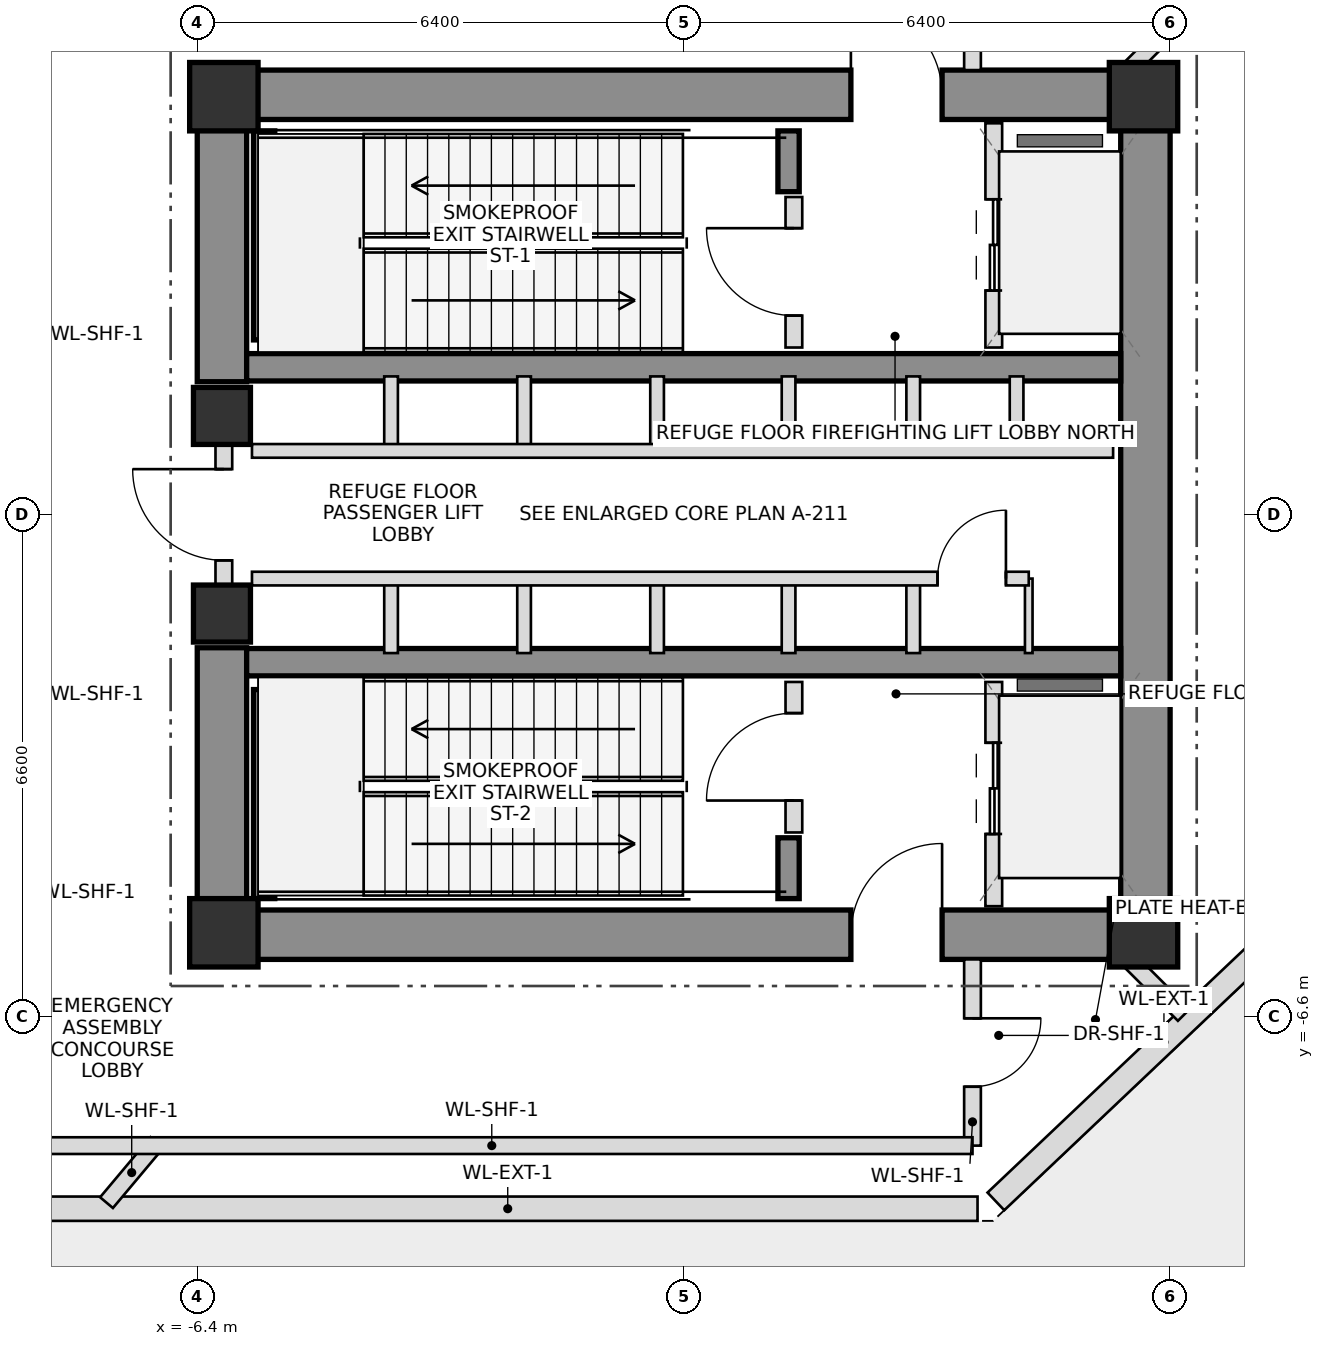
"""IFC4 building model, lengths in metres.
Left out: names, types, materials, properties, quantities, classifications, styles, units other than length and angle.
Written with IfcOpenShell. Run it as: python <this file> out.ifc"""

import sys

from ifc_helpers import new_model, si_unit, direction, frame, frame_2d, origin, origin_2d, place, context, subcontext, project, spatial, rectangle, extrude, source, transform, mapped, element, fill, save


model = new_model("IFC4")
c1 = context("Model", 3, precision=1e-05, world=origin(), true_north=direction((0.0, 1.0)))
c2 = subcontext(c1, "Body", "Model", "MODEL_VIEW")
j1 = project(units=[si_unit("LENGTHUNIT", "METRE"), si_unit("PLANEANGLEUNIT", "RADIAN")], contexts=[c1])
p1 = place(None, origin())
s1 = spatial("IfcSite", under=j1, at=p1, CompositionType="ELEMENT")
p2 = place(p1, origin())
s2 = spatial("IfcBuilding", under=s1, at=p2, CompositionType="ELEMENT")
p3 = place(p2, frame((0.0, 0.0, 119.9)))
s3 = spatial("IfcBuildingStorey", under=s2, at=p3, CompositionType="ELEMENT", Elevation=119.9)
m1 = source(origin(), c2, "Body", "SweptSolid", [
    extrude(rectangle(XDim=0.9, YDim=0.9, at=origin_2d()), origin(), (0.0, 0.0, 1.0), 5.1),
])
for number, where, z_axis, x_axis in (
    (1, (-6.05, -5.5, 0.0), (0.0, 0.0, 1.0), (1.0, 0.0, 0.0)),
    (2, (6.05, -5.5, 0.0), (0.0, 0.0, 1.0), (1.0, 0.0, 0.0)),
    (3, (6.05, 5.5, 0.0), (0.0, 0.0, 1.0), (1.0, 0.0, 0.0)),
    (4, (-6.05, 5.5, 0.0), (0.0, 0.0, 1.0), (1.0, 0.0, 0.0)),
):
    element("IfcColumn", number, at=place(p3, frame(where, z_axis=z_axis, x_axis=x_axis)), inside=s3, PredefinedType="COLUMN", context=c2, shape_type="MappedRepresentation", body=[
        mapped(m1, transform((0.0, 0.0, 0.0), scale=1.0)),
    ])
p4 = place(p3, frame((-6.4, 5.525, 0.0), z_axis=(0.0, 0.0, 1.0), x_axis=(1.0, 0.0, 0.0)))
e5 = element("IfcWall", 5, at=p4, inside=s3, PredefinedType="SHEAR", context=c2, shape_type="SweptSolid", body=[
    extrude(rectangle(XDim=12.8, YDim=0.65, at=frame_2d((6.4, 0.0))), origin(), (0.0, 0.0, 1.0), 5.1),
])
p5 = place(p4, frame((8.6, 0.0, 0.0)))
e6 = element("IfcOpeningElement", 6, at=p5, cuts=e5, PredefinedType="OPENING", context=c2, shape_type="SweptSolid", body=[
    extrude(rectangle(XDim=1.2, YDim=2.2, at=frame_2d((0.6, 1.1))), frame((0.0, 0.335, 0.0), z_axis=(0.0, -1.0, 0.0), x_axis=(1.0, 0.0, 0.0)), (0.0, 0.0, 1.0), 0.67),
])
p6 = place(p3, frame((-6.4, -5.525, 0.0), z_axis=(0.0, 0.0, 1.0), x_axis=(1.0, 0.0, 0.0)))
e7 = element("IfcWall", 7, at=p6, inside=s3, PredefinedType="SHEAR", context=c2, shape_type="SweptSolid", body=[
    extrude(rectangle(XDim=12.8, YDim=0.65, at=frame_2d((6.4, 0.0))), origin(), (0.0, 0.0, 1.0), 5.1),
])
p7 = place(p6, frame((8.6, 0.0, 0.0)))
e8 = element("IfcOpeningElement", 8, at=p7, cuts=e7, PredefinedType="OPENING", context=c2, shape_type="SweptSolid", body=[
    extrude(rectangle(XDim=1.2, YDim=2.2, at=frame_2d((0.6, 1.1))), frame((0.0, 0.335, 0.0), z_axis=(0.0, -1.0, 0.0), x_axis=(1.0, 0.0, 0.0)), (0.0, 0.0, 1.0), 0.67),
])
p8 = place(p3, frame((6.075, -5.2, 0.0), z_axis=(0.0, 0.0, 1.0), x_axis=(0.0, 1.0, 0.0)))
e9 = element("IfcWall", 9, at=p8, inside=s3, PredefinedType="SHEAR", context=c2, shape_type="SweptSolid", body=[
    extrude(rectangle(XDim=10.4, YDim=0.65, at=frame_2d((5.2, 0.0))), origin(), (0.0, 0.0, 1.0), 5.1),
])
for number, where, z_axis, x_axis in (
    (10, (-6.075, -5.2, 0.0), (0.0, 0.0, 1.0), (0.0, 1.0, 0.0)),
    (11, (-6.075, 1.75, 0.0), (0.0, 0.0, 1.0), (0.0, 1.0, 0.0)),
):
    element("IfcWall", number, at=place(p3, frame(where, z_axis=z_axis, x_axis=x_axis)), inside=s3, PredefinedType="SHEAR", context=c2, shape_type="SweptSolid", body=[
        extrude(rectangle(XDim=3.45, YDim=0.65, at=frame_2d((1.725, 0.0))), origin(), (0.0, 0.0, 1.0), 5.1),
    ])
for number, where, z_axis, x_axis in (
    (12, (-5.75, 1.94, 0.0), (0.0, 0.0, 1.0), (1.0, 0.0, 0.0)),
    (13, (-5.75, -1.94, 0.0), (0.0, 0.0, 1.0), (1.0, 0.0, 0.0)),
):
    element("IfcWall", number, at=place(p3, frame(where, z_axis=z_axis, x_axis=x_axis)), inside=s3, PredefinedType="SHEAR", context=c2, shape_type="SweptSolid", body=[
        extrude(rectangle(XDim=11.5, YDim=0.36, at=frame_2d((5.75, 0.0))), origin(), (0.0, 0.0, 1.0), 5.1),
    ])
p9 = place(p3, frame((-5.52, 2.3, 0.0), z_axis=(0.0, 0.0, 1.0), x_axis=(0.0, 1.0, 0.0)))
e14 = element("IfcWall", 14, at=p9, inside=s3, PredefinedType="SHEAR", context=c2, shape_type="SweptSolid", body=[
    extrude(rectangle(XDim=2.75, YDim=0.28, at=frame_2d((1.375, 0.0))), origin(), (0.0, 0.0, 1.0), 5.1),
])
p10 = place(p3, frame((1.38, 4.25, 0.0), z_axis=(0.0, 0.0, 1.0), x_axis=(0.0, 1.0, 0.0)))
e15 = element("IfcWall", 15, at=p10, inside=s3, PredefinedType="SHEAR", context=c2, shape_type="SweptSolid", body=[
    extrude(rectangle(XDim=0.8, YDim=0.28, at=frame_2d((0.4, 0.0))), origin(), (0.0, 0.0, 1.0), 5.1),
])
p11 = place(p3, frame((-5.52, -5.05, 0.0), z_axis=(0.0, 0.0, 1.0), x_axis=(0.0, 1.0, 0.0)))
e16 = element("IfcWall", 16, at=p11, inside=s3, PredefinedType="SHEAR", context=c2, shape_type="SweptSolid", body=[
    extrude(rectangle(XDim=2.75, YDim=0.28, at=frame_2d((1.375, 0.0))), origin(), (0.0, 0.0, 1.0), 5.1),
])
p12 = place(p3, frame((1.38, -5.05, 0.0), z_axis=(0.0, 0.0, 1.0), x_axis=(0.0, 1.0, 0.0)))
e17 = element("IfcWall", 17, at=p12, inside=s3, PredefinedType="SHEAR", context=c2, shape_type="SweptSolid", body=[
    extrude(rectangle(XDim=0.8, YDim=0.28, at=frame_2d((0.4, 0.0))), origin(), (0.0, 0.0, 1.0), 5.1),
])
m2 = source(origin(), c2, "Body", "SweptSolid", [
    extrude(rectangle(XDim=0.75, YDim=0.75, at=origin_2d()), origin(), (0.0, 0.0, 1.0), 5.1),
])
for number, where, z_axis, x_axis in (
    (18, (-6.075, -1.3, 0.0), (0.0, 0.0, 1.0), (1.0, 0.0, 0.0)),
    (19, (-6.075, 1.3, 0.0), (0.0, 0.0, 1.0), (1.0, 0.0, 0.0)),
):
    element("IfcColumn", number, at=place(p3, frame(where, z_axis=z_axis, x_axis=x_axis)), inside=s3, PredefinedType="COLUMN", context=c2, shape_type="MappedRepresentation", body=[
        mapped(m2, transform((0.0, 0.0, 0.0), scale=1.0)),
    ])
p13 = place(p3, frame((-6.05, -0.95, 0.0), z_axis=(0.0, 0.0, 1.0), x_axis=(0.0, 1.0, 0.0)))
e20 = element("IfcWall", 20, at=p13, inside=s3, PredefinedType="PLUMBINGWALL", context=c2, shape_type="SweptSolid", body=[
    extrude(rectangle(XDim=1.9, YDim=0.22, at=frame_2d((0.95, 0.0))), origin(), (0.0, 0.0, 1.0), 3.88),
])
p14 = place(p13, frame((0.35, 0.0, 0.0)))
e21 = element("IfcOpeningElement", 21, at=p14, cuts=e20, PredefinedType="OPENING", context=c2, shape_type="SweptSolid", body=[
    extrude(rectangle(XDim=1.2, YDim=2.2, at=frame_2d((0.6, 1.1))), frame((0.0, 0.12, 0.0), z_axis=(0.0, -1.0, 0.0), x_axis=(1.0, 0.0, 0.0)), (0.0, 0.0, 1.0), 0.24),
])
p15 = place(p3, frame((1.45, 2.2, 0.0), z_axis=(0.0, 0.0, 1.0), x_axis=(0.0, 1.0, 0.0)))
e22 = element("IfcWall", 22, at=p15, inside=s3, PredefinedType="PLUMBINGWALL", context=c2, shape_type="SweptSolid", body=[
    extrude(rectangle(XDim=1.98, YDim=0.22, at=frame_2d((0.99, 0.0))), origin(), (0.0, 0.0, 1.0), 4.9),
])
p16 = place(p15, frame((0.42, 0.0, 0.0)))
e23 = element("IfcOpeningElement", 23, at=p16, cuts=e22, PredefinedType="OPENING", context=c2, shape_type="SweptSolid", body=[
    extrude(rectangle(XDim=1.15, YDim=2.15, at=frame_2d((0.575, 1.075))), frame((0.0, 0.12, 0.0), z_axis=(0.0, -1.0, 0.0), x_axis=(1.0, 0.0, 0.0)), (0.0, 0.0, 1.0), 0.24),
])
p17 = place(p3, frame((4.08, 2.2, 0.0), z_axis=(0.0, 0.0, 1.0), x_axis=(0.0, 1.0, 0.0)))
e24 = element("IfcWall", 24, at=p17, inside=s3, PredefinedType="PLUMBINGWALL", context=c2, shape_type="SweptSolid", body=[
    extrude(rectangle(XDim=2.95, YDim=0.22, at=frame_2d((1.475, 0.0))), origin(), (0.0, 0.0, 1.0), 4.9),
])
p18 = place(p17, frame((0.75, 0.0, 0.0)))
e25 = element("IfcOpeningElement", 25, at=p18, cuts=e24, PredefinedType="OPENING", context=c2, shape_type="SweptSolid", body=[
    extrude(rectangle(XDim=1.2, YDim=2.25, at=frame_2d((0.6, 1.125))), frame((0.0, 0.12, 0.0), z_axis=(0.0, -1.0, 0.0), x_axis=(1.0, 0.0, 0.0)), (0.0, 0.0, 1.0), 0.24),
])
p19 = place(p3, frame((1.45, -4.18, 0.0), z_axis=(0.0, 0.0, 1.0), x_axis=(0.0, 1.0, 0.0)))
e26 = element("IfcWall", 26, at=p19, inside=s3, PredefinedType="PLUMBINGWALL", context=c2, shape_type="SweptSolid", body=[
    extrude(rectangle(XDim=1.98, YDim=0.22, at=frame_2d((0.99, 0.0))), origin(), (0.0, 0.0, 1.0), 4.9),
])
p20 = place(p19, frame((0.42, 0.0, 0.0)))
e27 = element("IfcOpeningElement", 27, at=p20, cuts=e26, PredefinedType="OPENING", context=c2, shape_type="SweptSolid", body=[
    extrude(rectangle(XDim=1.15, YDim=2.15, at=frame_2d((0.575, 1.075))), frame((0.0, 0.12, 0.0), z_axis=(0.0, -1.0, 0.0), x_axis=(1.0, 0.0, 0.0)), (0.0, 0.0, 1.0), 0.24),
])
p21 = place(p3, frame((4.08, -5.15, 0.0), z_axis=(0.0, 0.0, 1.0), x_axis=(0.0, 1.0, 0.0)))
e28 = element("IfcWall", 28, at=p21, inside=s3, PredefinedType="PLUMBINGWALL", context=c2, shape_type="SweptSolid", body=[
    extrude(rectangle(XDim=2.95, YDim=0.22, at=frame_2d((1.475, 0.0))), origin(), (0.0, 0.0, 1.0), 4.9),
])
p22 = place(p21, frame((0.95, 0.0, 0.0)))
e29 = element("IfcOpeningElement", 29, at=p22, cuts=e28, PredefinedType="OPENING", context=c2, shape_type="SweptSolid", body=[
    extrude(rectangle(XDim=1.2, YDim=2.25, at=frame_2d((0.6, 1.125))), frame((0.0, 0.12, 0.0), z_axis=(0.0, -1.0, 0.0), x_axis=(1.0, 0.0, 0.0)), (0.0, 0.0, 1.0), 0.24),
])
for number, where, z_axis, x_axis in (
    (30, (-3.85, 0.84, 0.0), (0.0, 0.0, 1.0), (0.0, 1.0, 0.0)),
    (31, (-3.85, -1.82, 0.0), (0.0, 0.0, 1.0), (0.0, 1.0, 0.0)),
    (32, (-2.1, 0.84, 0.0), (0.0, 0.0, 1.0), (0.0, 1.0, 0.0)),
    (33, (-2.1, -1.82, 0.0), (0.0, 0.0, 1.0), (0.0, 1.0, 0.0)),
    (34, (-0.35, 0.84, 0.0), (0.0, 0.0, 1.0), (0.0, 1.0, 0.0)),
    (35, (-0.35, -1.82, 0.0), (0.0, 0.0, 1.0), (0.0, 1.0, 0.0)),
    (36, (1.38, 0.84, 0.0), (0.0, 0.0, 1.0), (0.0, 1.0, 0.0)),
    (37, (1.38, -1.82, 0.0), (0.0, 0.0, 1.0), (0.0, 1.0, 0.0)),
    (38, (3.02, 0.84, 0.0), (0.0, 0.0, 1.0), (0.0, 1.0, 0.0)),
    (39, (4.38, 0.84, 0.0), (0.0, 0.0, 1.0), (0.0, 1.0, 0.0)),
    (40, (3.02, -1.82, 0.0), (0.0, 0.0, 1.0), (0.0, 1.0, 0.0)),
):
    element("IfcWall", number, at=place(p3, frame(where, z_axis=z_axis, x_axis=x_axis)), inside=s3, PredefinedType="PLUMBINGWALL", context=c2, shape_type="SweptSolid", body=[
        extrude(rectangle(XDim=0.98, YDim=0.18, at=frame_2d((0.49, 0.0))), origin(), (0.0, 0.0, 1.0), 4.9),
    ])
p23 = place(p3, frame((4.54, -1.82, 0.0), z_axis=(0.0, 0.0, 1.0), x_axis=(0.0, 1.0, 0.0)))
e41 = element("IfcWall", 41, at=p23, inside=s3, PredefinedType="PARTITIONING", context=c2, shape_type="SweptSolid", body=[
    extrude(rectangle(XDim=0.98, YDim=0.1, at=frame_2d((0.49, 0.0))), origin(), (0.0, 0.0, 1.0), 4.9),
])
p24 = place(p3, frame((-5.68, 0.84, 0.0), z_axis=(0.0, 0.0, 1.0), x_axis=(1.0, 0.0, 0.0)))
e42 = element("IfcWall", 42, at=p24, inside=s3, PredefinedType="PLUMBINGWALL", context=c2, shape_type="SweptSolid", body=[
    extrude(rectangle(XDim=11.33, YDim=0.18, at=frame_2d((5.665, 0.0))), origin(), (0.0, 0.0, 1.0), 4.9),
])
p25 = place(p3, frame((-5.68, -0.84, 0.0), z_axis=(0.0, 0.0, 1.0), x_axis=(1.0, 0.0, 0.0)))
e43 = element("IfcWall", 43, at=p25, inside=s3, PredefinedType="PLUMBINGWALL", context=c2, shape_type="SweptSolid", body=[
    extrude(rectangle(XDim=10.22, YDim=0.18, at=frame_2d((5.11, 0.0))), origin(), (0.0, 0.0, 1.0), 4.9),
])
p26 = place(p25, frame((9.02, 0.0, 0.0)))
e44 = element("IfcOpeningElement", 44, at=p26, cuts=e43, PredefinedType="OPENING", context=c2, shape_type="SweptSolid", body=[
    extrude(rectangle(XDim=0.9, YDim=2.05, at=frame_2d((0.45, 1.025))), frame((0.0, 0.1, 0.0), z_axis=(0.0, -1.0, 0.0), x_axis=(1.0, 0.0, 0.0)), (0.0, 0.0, 1.0), 0.2),
])
p27 = place(p3, frame((8.53, -4.843, 0.0), z_axis=(0.0, 0.0, 1.0), x_axis=(-0.725866328242, -0.687835789651, 0.0)))
e45 = element("IfcWall", 45, at=p27, inside=s3, PredefinedType="SOLIDWALL", context=c2, shape_type="SweptSolid", body=[
    extrude(rectangle(XDim=6.092, YDim=0.32, at=frame_2d((3.046, 0.0))), origin(), (0.0, 0.0, 1.0), 3.555),
])
p28 = place(p3, frame((3.866, -9.13, 0.0), z_axis=(0.0, 0.0, 1.0), x_axis=(-1.0, 0.0, 0.0)))
e46 = element("IfcWall", 46, at=p28, inside=s3, PredefinedType="SOLIDWALL", context=c2, shape_type="SweptSolid", body=[
    extrude(rectangle(XDim=12.363, YDim=0.32, at=frame_2d((6.181, 0.0))), origin(), (0.0, 0.0, 1.0), 4.9),
])
p29 = place(p3, frame((5.81, 5.81, 0.0), z_axis=(0.0, 0.0, 1.0), x_axis=(0.707106781187, 0.707106781187, 0.0)))
e47 = element("IfcWall", 47, at=p29, inside=s3, PredefinedType="PLUMBINGWALL", context=c2, shape_type="SweptSolid", body=[
    extrude(rectangle(XDim=3.216, YDim=0.22, at=frame_2d((1.608, 0.0))), origin(), (0.0, 0.0, 1.0), 3.555),
])
p30 = place(p3, frame((-6.931, -8.26, 0.0), z_axis=(0.0, 0.0, 1.0), x_axis=(-0.642881168458, -0.765965928251, 0.0)))
e48 = element("IfcWall", 48, at=p30, inside=s3, PredefinedType="PLUMBINGWALL", context=c2, shape_type="SweptSolid", body=[
    extrude(rectangle(XDim=1.031, YDim=0.22, at=frame_2d((0.516, 0.0))), origin(), (0.0, 0.0, 1.0), 4.9),
])
p31 = place(p3, frame((5.81, -5.81, 0.0), z_axis=(0.0, 0.0, 1.0), x_axis=(0.707106781187, -0.707106781187, 0.0)))
e49 = element("IfcWall", 49, at=p31, inside=s3, PredefinedType="PLUMBINGWALL", context=c2, shape_type="SweptSolid", body=[
    extrude(rectangle(XDim=1.089, YDim=0.22, at=frame_2d((0.545, 0.0))), origin(), (0.0, 0.0, 1.0), 3.555),
])
p32 = place(p3, frame((3.8, -5.85, 0.0), z_axis=(0.0, 0.0, 1.0), x_axis=(0.0, -1.0, 0.0)))
e50 = element("IfcWall", 50, at=p32, inside=s3, PredefinedType="PLUMBINGWALL", context=c2, shape_type="SweptSolid", body=[
    extrude(rectangle(XDim=2.45, YDim=0.22, at=frame_2d((1.225, 0.0))), origin(), (0.0, 0.0, 1.0), 4.9),
])
p33 = place(p32, frame((0.775, 0.0, 0.0)))
e51 = element("IfcOpeningElement", 51, at=p33, cuts=e50, PredefinedType="OPENING", context=c2, shape_type="SweptSolid", body=[
    extrude(rectangle(XDim=0.9, YDim=2.05, at=frame_2d((0.45, 1.025))), frame((0.0, 0.12, 0.0), z_axis=(0.0, -1.0, 0.0), x_axis=(1.0, 0.0, 0.0)), (0.0, 0.0, 1.0), 0.24),
])
p34 = place(p3, frame((3.8, -8.3, 0.0), z_axis=(0.0, 0.0, 1.0), x_axis=(-1.0, 0.0, 0.0)))
e52 = element("IfcWall", 52, at=p34, inside=s3, PredefinedType="PLUMBINGWALL", context=c2, shape_type="SweptSolid", body=[
    extrude(rectangle(XDim=12.65, YDim=0.22, at=frame_2d((6.325, 0.0))), origin(), (0.0, 0.0, 1.0), 4.9),
])
p35 = place(p3, frame((3.8, 8.3, 0.0), z_axis=(0.0, 0.0, 1.0), x_axis=(0.0, -1.0, 0.0)))
e53 = element("IfcWall", 53, at=p35, inside=s3, PredefinedType="PLUMBINGWALL", context=c2, shape_type="SweptSolid", body=[
    extrude(rectangle(XDim=2.45, YDim=0.22, at=frame_2d((1.225, 0.0))), origin(), (0.0, 0.0, 1.0), 4.9),
])
p36 = place(p5, origin())
e54 = element("IfcDoor", 54, at=p36, inside=s3, OperationType="SINGLE_SWING_LEFT", PredefinedType="DOOR", context=c2, shape_type="SweptSolid", body=[
    extrude(rectangle(XDim=1.2, YDim=2.2, at=frame_2d((0.6, 1.1))), frame((0.0, 0.025, 0.0), z_axis=(0.0, -1.0, 0.0), x_axis=(1.0, 0.0, 0.0)), (0.0, 0.0, 1.0), 0.05),
])
fill(e6, e54)
p37 = place(p7, origin())
e55 = element("IfcDoor", 55, at=p37, inside=s3, OperationType="SINGLE_SWING_RIGHT", PredefinedType="DOOR", context=c2, shape_type="SweptSolid", body=[
    extrude(rectangle(XDim=1.2, YDim=2.2, at=frame_2d((0.6, 1.1))), frame((0.0, 0.025, 0.0), z_axis=(0.0, -1.0, 0.0), x_axis=(1.0, 0.0, 0.0)), (0.0, 0.0, 1.0), 0.05),
])
fill(e8, e55)
p38 = place(p14, origin())
e56 = element("IfcDoor", 56, at=p38, inside=s3, OperationType="SINGLE_SWING_RIGHT", PredefinedType="DOOR", context=c2, shape_type="SweptSolid", body=[
    extrude(rectangle(XDim=1.2, YDim=2.2, at=frame_2d((0.6, 1.1))), frame((0.0, 0.025, 0.0), z_axis=(0.0, -1.0, 0.0), x_axis=(1.0, 0.0, 0.0)), (0.0, 0.0, 1.0), 0.05),
])
fill(e21, e56)
p39 = place(p16, origin())
e57 = element("IfcDoor", 57, at=p39, inside=s3, OperationType="SINGLE_SWING_RIGHT", PredefinedType="DOOR", context=c2, shape_type="SweptSolid", body=[
    extrude(rectangle(XDim=1.15, YDim=2.15, at=frame_2d((0.575, 1.075))), frame((0.0, 0.025, 0.0), z_axis=(0.0, -1.0, 0.0), x_axis=(1.0, 0.0, 0.0)), (0.0, 0.0, 1.0), 0.05),
])
fill(e23, e57)
p40 = place(p18, origin())
e58 = element("IfcDoor", 58, at=p40, inside=s3, OperationType="DOUBLE_DOOR_SLIDING", PredefinedType="DOOR", context=c2, shape_type="SweptSolid", body=[
    extrude(rectangle(XDim=1.2, YDim=2.25, at=frame_2d((0.6, 1.125))), frame((0.0, 0.025, 0.0), z_axis=(0.0, -1.0, 0.0), x_axis=(1.0, 0.0, 0.0)), (0.0, 0.0, 1.0), 0.05),
])
fill(e25, e58)
p41 = place(p20, origin())
e59 = element("IfcDoor", 59, at=p41, inside=s3, OperationType="SINGLE_SWING_LEFT", PredefinedType="DOOR", context=c2, shape_type="SweptSolid", body=[
    extrude(rectangle(XDim=1.15, YDim=2.15, at=frame_2d((0.575, 1.075))), frame((0.0, 0.025, 0.0), z_axis=(0.0, -1.0, 0.0), x_axis=(1.0, 0.0, 0.0)), (0.0, 0.0, 1.0), 0.05),
])
fill(e27, e59)
p42 = place(p22, origin())
e60 = element("IfcDoor", 60, at=p42, inside=s3, OperationType="DOUBLE_DOOR_SLIDING", PredefinedType="DOOR", context=c2, shape_type="SweptSolid", body=[
    extrude(rectangle(XDim=1.2, YDim=2.25, at=frame_2d((0.6, 1.125))), frame((0.0, 0.025, 0.0), z_axis=(0.0, -1.0, 0.0), x_axis=(1.0, 0.0, 0.0)), (0.0, 0.0, 1.0), 0.05),
])
fill(e29, e60)
p43 = place(p26, origin())
e61 = element("IfcDoor", 61, at=p43, inside=s3, OperationType="SINGLE_SWING_RIGHT", PredefinedType="DOOR", context=c2, shape_type="SweptSolid", body=[
    extrude(rectangle(XDim=0.9, YDim=2.05, at=frame_2d((0.45, 1.025))), frame((0.0, 0.025, 0.0), z_axis=(0.0, -1.0, 0.0), x_axis=(1.0, 0.0, 0.0)), (0.0, 0.0, 1.0), 0.05),
])
fill(e44, e61)
p44 = place(p33, origin())
e62 = element("IfcDoor", 62, at=p44, inside=s3, OperationType="SINGLE_SWING_LEFT", PredefinedType="DOOR", context=c2, shape_type="SweptSolid", body=[
    extrude(rectangle(XDim=0.9, YDim=2.05, at=frame_2d((0.45, 1.025))), frame((0.0, 0.025, 0.0), z_axis=(0.0, -1.0, 0.0), x_axis=(1.0, 0.0, 0.0)), (0.0, 0.0, 1.0), 0.05),
])
fill(e51, e62)
save(model, sys.argv[1])
